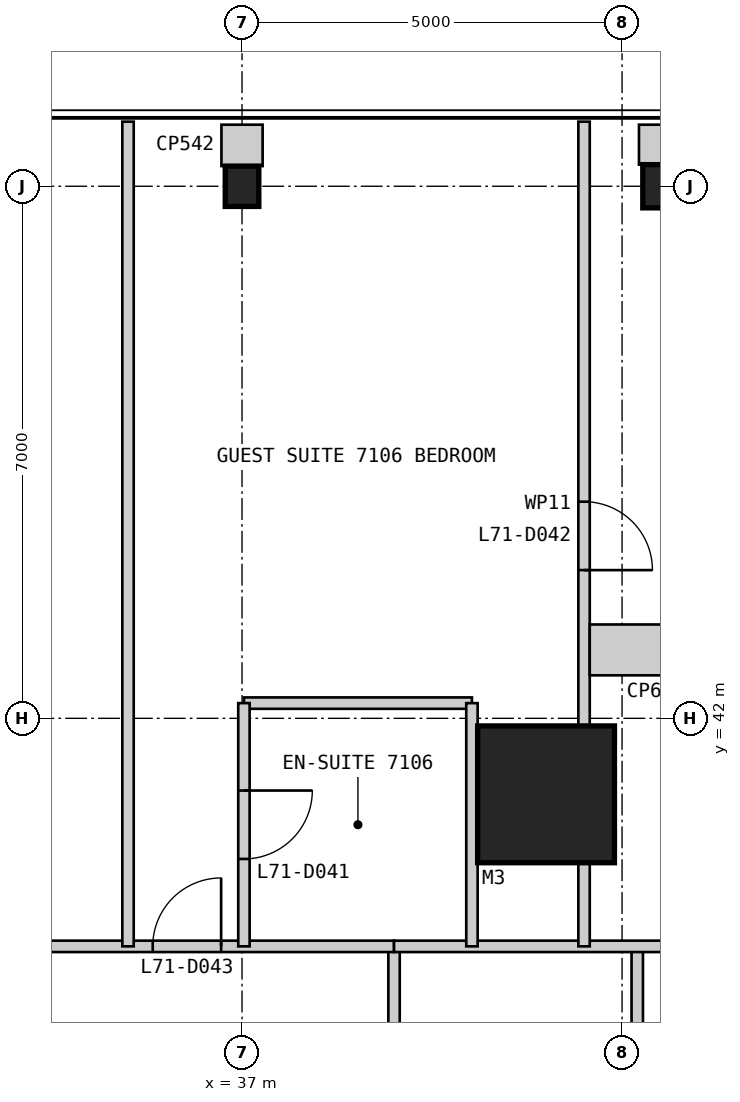
"""IFC4 building model, lengths in metres.
Left out: names, types, materials, properties, quantities, classifications, styles, units other than length and angle.
Written with IfcOpenShell. Run it as: python <this file> out.ifc"""

import sys

from ifc_helpers import new_model, si_unit, direction, frame, frame_2d, origin, origin_2d, place, context, subcontext, project, spatial, rectangle, i_section, extrude, element, fill, save


model = new_model("IFC4")
c1 = context("Model", 3, precision=1e-05, world=origin(), true_north=direction((0.0, 1.0)))
c2 = subcontext(c1, "Body", "Model", "MODEL_VIEW")
j1 = project(units=[si_unit("LENGTHUNIT", "METRE"), si_unit("PLANEANGLEUNIT", "RADIAN")], contexts=[c1])
p1 = place(None, origin())
s1 = spatial("IfcSite", under=j1, at=p1, CompositionType="ELEMENT")
p2 = place(p1, origin())
s2 = spatial("IfcBuilding", under=s1, at=p2, CompositionType="ELEMENT")
p3 = place(p2, frame((0.0, 0.0, 293.4)))
s3 = spatial("IfcBuildingStorey", under=s2, at=p3, CompositionType="ELEMENT", Elevation=293.4)
p4 = place(p3, frame((41.0, 41.0, 0.0), z_axis=(0.0, 0.0, 1.0), x_axis=(1.0, 0.0, 0.0)))
e1 = element("IfcColumn", 1, at=p4, inside=s3, PredefinedType="COLUMN", context=c2, shape_type="SweptSolid", body=[
    extrude(rectangle(XDim=1.8, YDim=1.8, at=origin_2d()), origin(), (0.0, 0.0, 1.0), 3.4),
])
p5 = place(p3, frame((42.5, 49.0, 0.0), z_axis=(0.0, 0.0, 1.0), x_axis=(1.0, 0.0, 0.0)))
e2 = element("IfcColumn", 2, at=p5, inside=s3, PredefinedType="COLUMN", context=c2, shape_type="SweptSolid", body=[
    extrude(i_section(OverallWidth=0.455, OverallDepth=0.569, WebThickness=0.078, FlangeThickness=0.125, at=origin_2d()), origin(), (0.0, 0.0, 1.0), 3.4),
])
p6 = place(p3, frame((37.0, 49.0, 0.0), z_axis=(0.0, 0.0, 1.0), x_axis=(1.0, 0.0, 0.0)))
e3 = element("IfcColumn", 3, at=p6, inside=s3, PredefinedType="COLUMN", context=c2, shape_type="SweptSolid", body=[
    extrude(i_section(OverallWidth=0.442, OverallDepth=0.531, WebThickness=0.066, FlangeThickness=0.106, at=origin_2d()), origin(), (0.0, 0.0, 1.0), 3.4),
])
p7 = place(p3, frame((39.0, 11.0, 0.0), z_axis=(0.0, 0.0, 1.0), x_axis=(0.0, 1.0, 0.0)))
e4 = element("IfcWall", 4, at=p7, inside=s3, PredefinedType="PARTITIONING", context=c2, shape_type="SweptSolid", body=[
    extrude(rectangle(XDim=28.0, YDim=0.15, at=frame_2d((14.0, 0.0))), origin(), (0.0, 0.0, 1.0), 2.794),
])
p8 = place(p7, frame((1.85, 0.0, 0.0)))
e5 = element("IfcOpeningElement", 5, at=p8, cuts=e4, PredefinedType="OPENING", context=c2, shape_type="SweptSolid", body=[
    extrude(rectangle(XDim=0.9, YDim=2.1, at=frame_2d((0.45, 1.05))), frame((0.0, 0.085, 0.0), z_axis=(0.0, -1.0, 0.0), x_axis=(1.0, 0.0, 0.0)), (0.0, 0.0, 1.0), 0.17),
])
p9 = place(p7, frame((11.0, 0.0, 0.0)))
e6 = element("IfcOpeningElement", 6, at=p9, cuts=e4, PredefinedType="OPENING", context=c2, shape_type="SweptSolid", body=[
    extrude(rectangle(XDim=0.9, YDim=2.1, at=frame_2d((0.45, 1.05))), frame((0.0, 0.085, 0.0), z_axis=(0.0, -1.0, 0.0), x_axis=(1.0, 0.0, 0.0)), (0.0, 0.0, 1.0), 0.17),
])
p10 = place(p7, frame((23.1, 0.0, 0.0)))
e7 = element("IfcOpeningElement", 7, at=p10, cuts=e4, PredefinedType="OPENING", context=c2, shape_type="SweptSolid", body=[
    extrude(rectangle(XDim=0.9, YDim=2.1, at=frame_2d((0.45, 1.05))), frame((0.0, 0.085, 0.0), z_axis=(0.0, -1.0, 0.0), x_axis=(1.0, 0.0, 0.0)), (0.0, 0.0, 1.0), 0.17),
])
p11 = place(p3, frame((42.2, 35.6, 0.0), z_axis=(0.0, 0.0, 1.0), x_axis=(0.0, 1.0, 0.0)))
e8 = element("IfcWall", 8, at=p11, inside=s3, PredefinedType="PARTITIONING", context=c2, shape_type="SweptSolid", body=[
    extrude(rectangle(XDim=3.4, YDim=0.15, at=frame_2d((1.7, 0.0))), origin(), (0.0, 0.0, 1.0), 3.2),
])
p12 = place(p3, frame((39.0, 39.0, 0.0), z_axis=(0.0, 0.0, 1.0), x_axis=(-1.0, 0.0, 0.0)))
e9 = element("IfcWall", 9, at=p12, inside=s3, PredefinedType="PARTITIONING", context=c2, shape_type="SweptSolid", body=[
    extrude(rectangle(XDim=28.0, YDim=0.15, at=frame_2d((14.0, 0.0))), origin(), (0.0, 0.0, 1.0), 2.794),
])
p13 = place(p12, frame((2.275, 0.0, 0.0)))
e10 = element("IfcOpeningElement", 10, at=p13, cuts=e9, PredefinedType="OPENING", context=c2, shape_type="SweptSolid", body=[
    extrude(rectangle(XDim=0.9, YDim=2.1, at=frame_2d((0.45, 1.05))), frame((0.0, 0.085, 0.0), z_axis=(0.0, -1.0, 0.0), x_axis=(1.0, 0.0, 0.0)), (0.0, 0.0, 1.0), 0.17),
])
p14 = place(p12, frame((10.6, 0.0, 0.0)))
e11 = element("IfcOpeningElement", 11, at=p14, cuts=e9, PredefinedType="OPENING", context=c2, shape_type="SweptSolid", body=[
    extrude(rectangle(XDim=0.9, YDim=2.1, at=frame_2d((0.45, 1.05))), frame((0.0, 0.085, 0.0), z_axis=(0.0, -1.0, 0.0), x_axis=(1.0, 0.0, 0.0)), (0.0, 0.0, 1.0), 0.17),
])
p15 = place(p12, frame((17.0, 0.0, 0.0)))
e12 = element("IfcOpeningElement", 12, at=p15, cuts=e9, PredefinedType="OPENING", context=c2, shape_type="SweptSolid", body=[
    extrude(rectangle(XDim=0.9, YDim=2.1, at=frame_2d((0.45, 1.05))), frame((0.0, 0.085, 0.0), z_axis=(0.0, -1.0, 0.0), x_axis=(1.0, 0.0, 0.0)), (0.0, 0.0, 1.0), 0.17),
])
p16 = place(p12, frame((23.2, 0.0, 0.0)))
e13 = element("IfcOpeningElement", 13, at=p16, cuts=e9, PredefinedType="OPENING", context=c2, shape_type="SweptSolid", body=[
    extrude(rectangle(XDim=1.0, YDim=2.1, at=frame_2d((0.5, 1.05))), frame((0.0, 0.085, 0.0), z_axis=(0.0, -1.0, 0.0), x_axis=(1.0, 0.0, 0.0)), (0.0, 0.0, 1.0), 0.17),
])
p17 = place(p3, frame((49.85, 39.0, 0.0), z_axis=(0.0, 0.0, 1.0), x_axis=(-1.0, 0.0, 0.0)))
e14 = element("IfcWall", 14, at=p17, inside=s3, PredefinedType="PARTITIONING", context=c2, shape_type="SweptSolid", body=[
    extrude(rectangle(XDim=10.85, YDim=0.15, at=frame_2d((5.425, 0.0))), origin(), (0.0, 0.0, 1.0), 2.794),
])
p18 = place(p3, frame((40.025, 42.2, 0.0), z_axis=(0.0, 0.0, 1.0), x_axis=(-1.0, 0.0, 0.0)))
e15 = element("IfcWall", 15, at=p18, inside=s3, PredefinedType="PARTITIONING", context=c2, shape_type="SweptSolid", body=[
    extrude(rectangle(XDim=3.0, YDim=0.15, at=frame_2d((1.5, 0.0))), origin(), (0.0, 0.0, 1.0), 3.2),
])
p19 = place(p3, frame((37.025, 42.2, 0.0), z_axis=(0.0, 0.0, 1.0), x_axis=(0.0, -1.0, 0.0)))
e16 = element("IfcWall", 16, at=p19, inside=s3, PredefinedType="PARTITIONING", context=c2, shape_type="SweptSolid", body=[
    extrude(rectangle(XDim=3.2, YDim=0.15, at=frame_2d((1.6, 0.0))), origin(), (0.0, 0.0, 1.0), 2.253),
])
p20 = place(p19, frame((1.15, 0.0, 0.0)))
e17 = element("IfcOpeningElement", 17, at=p20, cuts=e16, PredefinedType="OPENING", context=c2, shape_type="SweptSolid", body=[
    extrude(rectangle(XDim=0.9, YDim=2.1, at=frame_2d((0.45, 1.05))), frame((0.0, 0.085, 0.0), z_axis=(0.0, -1.0, 0.0), x_axis=(1.0, 0.0, 0.0)), (0.0, 0.0, 1.0), 0.17),
])
p21 = place(p3, frame((40.025, 42.2, 0.0), z_axis=(0.0, 0.0, 1.0), x_axis=(0.0, -1.0, 0.0)))
e18 = element("IfcWall", 18, at=p21, inside=s3, PredefinedType="PARTITIONING", context=c2, shape_type="SweptSolid", body=[
    extrude(rectangle(XDim=3.2, YDim=0.15, at=frame_2d((1.6, 0.0))), origin(), (0.0, 0.0, 1.0), 3.2),
])
p22 = place(p3, frame((41.5, 49.85, 0.0), z_axis=(0.0, 0.0, 1.0), x_axis=(0.0, -1.0, 0.0)))
e19 = element("IfcWall", 19, at=p22, inside=s3, PredefinedType="PARTITIONING", context=c2, shape_type="SweptSolid", body=[
    extrude(rectangle(XDim=10.85, YDim=0.15, at=frame_2d((5.425, 0.0))), origin(), (0.0, 0.0, 1.0), 3.2),
])
p23 = place(p22, frame((5.0, 0.0, 0.0)))
e20 = element("IfcOpeningElement", 20, at=p23, cuts=e19, PredefinedType="OPENING", context=c2, shape_type="SweptSolid", body=[
    extrude(rectangle(XDim=0.9, YDim=2.1, at=frame_2d((0.45, 1.05))), frame((0.0, 0.085, 0.0), z_axis=(0.0, -1.0, 0.0), x_axis=(1.0, 0.0, 0.0)), (0.0, 0.0, 1.0), 0.17),
])
p24 = place(p3, frame((35.5, 49.85, 0.0), z_axis=(0.0, 0.0, 1.0), x_axis=(0.0, -1.0, 0.0)))
e21 = element("IfcWall", 21, at=p24, inside=s3, PredefinedType="PARTITIONING", context=c2, shape_type="SweptSolid", body=[
    extrude(rectangle(XDim=10.85, YDim=0.15, at=frame_2d((5.425, 0.0))), origin(), (0.0, 0.0, 1.0), 3.2),
])
p25 = place(p3, frame((41.575, 42.9, 0.0), z_axis=(0.0, 0.0, 1.0), x_axis=(1.0, 0.0, 0.0)))
e22 = element("IfcWall", 22, at=p25, inside=s3, PredefinedType="PARTITIONING", context=c2, shape_type="SweptSolid", body=[
    extrude(rectangle(XDim=1.098, YDim=0.669, at=frame_2d((0.549, 0.0))), origin(), (0.0, 0.0, 1.0), 3.2),
])
p26 = place(p3, frame((42.5, 49.81, 0.0), z_axis=(0.0, 0.0, 1.0), x_axis=(0.0, -1.0, 0.0)))
e23 = element("IfcWall", 23, at=p26, inside=s3, PredefinedType="PARTITIONING", context=c2, shape_type="SweptSolid", body=[
    extrude(rectangle(XDim=0.526, YDim=0.555, at=frame_2d((0.263, 0.0))), origin(), (0.0, 0.0, 1.0), 3.2),
])
p27 = place(p3, frame((37.0, 49.81, 0.0), z_axis=(0.0, 0.0, 1.0), x_axis=(0.0, -1.0, 0.0)))
e24 = element("IfcWall", 24, at=p27, inside=s3, PredefinedType="PARTITIONING", context=c2, shape_type="SweptSolid", body=[
    extrude(rectangle(XDim=0.545, YDim=0.542, at=frame_2d((0.272, 0.0))), origin(), (0.0, 0.0, 1.0), 3.2),
])
p28 = place(p20, origin())
e25 = element("IfcDoor", 25, at=p28, inside=s3, OperationType="SINGLE_SWING_LEFT", PredefinedType="DOOR", context=c2, shape_type="SweptSolid", body=[
    extrude(rectangle(XDim=0.9, YDim=2.1, at=frame_2d((0.45, 1.05))), frame((0.0, 0.025, 0.0), z_axis=(0.0, -1.0, 0.0), x_axis=(1.0, 0.0, 0.0)), (0.0, 0.0, 1.0), 0.05),
])
fill(e17, e25)
p29 = place(p23, origin())
e26 = element("IfcDoor", 26, at=p29, inside=s3, OperationType="SINGLE_SWING_RIGHT", PredefinedType="DOOR", context=c2, shape_type="SweptSolid", body=[
    extrude(rectangle(XDim=0.9, YDim=2.1, at=frame_2d((0.45, 1.05))), frame((0.0, 0.025, 0.0), z_axis=(0.0, -1.0, 0.0), x_axis=(1.0, 0.0, 0.0)), (0.0, 0.0, 1.0), 0.05),
])
fill(e20, e26)
p30 = place(p13, frame((0.9, 0.0, 0.0), z_axis=(0.0, 0.0, 1.0), x_axis=(-1.0, 0.0, 0.0)))
e27 = element("IfcDoor", 27, at=p30, inside=s3, OperationType="SINGLE_SWING_RIGHT", PredefinedType="DOOR", context=c2, shape_type="SweptSolid", body=[
    extrude(rectangle(XDim=0.9, YDim=2.1, at=frame_2d((0.45, 1.05))), frame((0.0, 0.025, 0.0), z_axis=(0.0, -1.0, 0.0), x_axis=(1.0, 0.0, 0.0)), (0.0, 0.0, 1.0), 0.05),
])
fill(e10, e27)
save(model, sys.argv[1])
